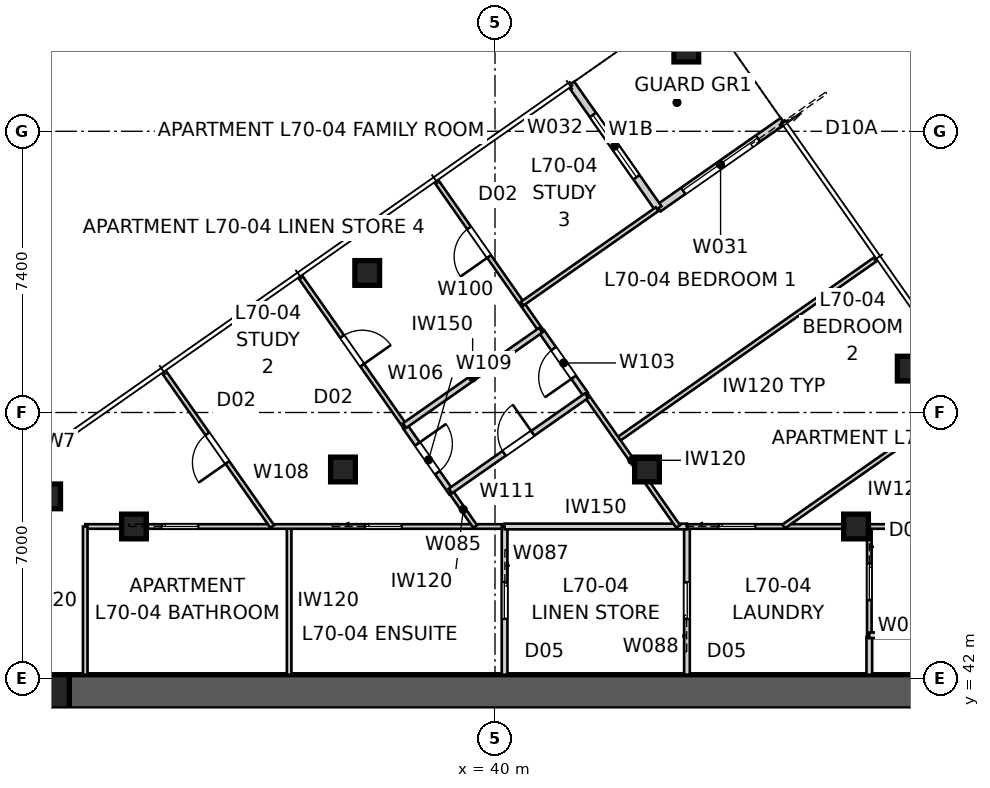
"""IFC4 building model, lengths in metres.
Left out: names, types, materials, properties, quantities, classifications, styles, units other than length and angle.
Written with IfcOpenShell. Run it as: python <this file> out.ifc"""

import sys

from ifc_helpers import new_model, si_unit, direction, frame, frame_2d, origin, origin_2d, place, context, subcontext, project, spatial, polyline, rectangle, outline, extrude, element, fill, save


model = new_model("IFC4")
c1 = context("Model", 3, precision=1e-05, world=origin(), true_north=direction((0.0, 1.0)))
c2 = subcontext(c1, "Body", "Model", "MODEL_VIEW")
j1 = project(units=[si_unit("LENGTHUNIT", "METRE"), si_unit("PLANEANGLEUNIT", "RADIAN")], contexts=[c1])
p1 = place(None, origin())
s1 = spatial("IfcSite", under=j1, at=p1, CompositionType="ELEMENT")
p2 = place(p1, origin())
s2 = spatial("IfcBuilding", under=s1, at=p2, CompositionType="ELEMENT")
p3 = place(p2, frame((0.0, 0.0, 254.0)))
s3 = spatial("IfcBuildingStorey", under=s2, at=p3, CompositionType="ELEMENT", Elevation=254.0)
p4 = place(p3, frame((28.8, 41.65, 0.0), z_axis=(0.0, 0.0, 1.0), x_axis=(1.0, 0.0, 0.0)))
e1 = element("IfcWall", 1, at=p4, inside=s3, PredefinedType="SHEAR", context=c2, shape_type="SweptSolid", body=[
    extrude(outline(polyline([(0.0, -0.45), (22.4, -0.45), (22.4, -0.025), (22.85, -0.025), (22.85, 0.025), (22.4, 0.025), (22.4, 0.45), (0.0, 0.45), (0.0, 0.025), (-0.45, 0.025), (-0.45, -0.025), (0.0, -0.025), (0.0, -0.45)])), origin(), (0.0, 0.0, 1.0), 3.4),
])
p5 = place(p3, frame((28.35, 41.2, 0.0), z_axis=(0.0, 0.0, 1.0), x_axis=(0.0, -1.0, 0.0)))
e2 = element("IfcWall", 2, at=p5, inside=s3, PredefinedType="SHEAR", context=c2, shape_type="SweptSolid", body=[
    extrude(outline(polyline([(0.0, -0.45), (22.4, -0.45), (22.4, -0.025), (22.85, -0.025), (22.85, 0.025), (22.4, 0.025), (22.4, 0.45), (0.0, 0.45), (0.0, 0.025), (-0.45, 0.025), (-0.45, -0.025), (0.0, -0.025), (0.0, -0.45)])), origin(), (0.0, 0.0, 1.0), 3.4),
])
p6 = place(p5, frame((11.14, 0.0, 0.0)))
e3 = element("IfcOpeningElement", 3, at=p6, cuts=e2, PredefinedType="OPENING", context=c2, shape_type="SweptSolid", body=[
    extrude(rectangle(XDim=1.02, YDim=2.4, at=frame_2d((0.51, 1.2))), frame((0.0, 0.46, 0.0), z_axis=(0.0, -1.0, 0.0), x_axis=(1.0, 0.0, 0.0)), (0.0, 0.0, 1.0), 0.92),
])
p7 = place(p3, frame((28.35, 41.65, 0.0), z_axis=(0.0, 0.0, 1.0), x_axis=(1.0, 0.0, 0.0)))
e4 = element("IfcColumn", 4, at=p7, inside=s3, PredefinedType="COLUMN", context=c2, shape_type="SweptSolid", body=[
    extrude(rectangle(XDim=0.9, YDim=0.9, at=origin_2d()), origin(), (0.0, 0.0, 1.0), 3.4),
])
for number, where, z_axis, x_axis in (
    (5, (50.914, 50.155, 0.0), (0.0, 0.0, 1.0), (1.0, 0.0, 0.0)),
    (6, (45.034, 58.551, 0.0), (0.0, 0.0, 1.0), (1.0, 0.0, 0.0)),
    (7, (36.638, 52.672, 0.0), (0.0, 0.0, 1.0), (1.0, 0.0, 0.0)),
    (8, (28.242, 46.793, 0.0), (0.0, 0.0, 1.0), (1.0, 0.0, 0.0)),
    (9, (49.5, 46.0, 0.0), (0.0, 0.0, 1.0), (1.0, 0.0, 0.0)),
    (10, (44.0, 47.5, 0.0), (0.0, 0.0, 1.0), (1.0, 0.0, 0.0)),
    (11, (36.0, 47.5, 0.0), (0.0, 0.0, 1.0), (1.0, 0.0, 0.0)),
    (12, (30.5, 46.0, 0.0), (0.0, 0.0, 1.0), (1.0, 0.0, 0.0)),
):
    element("IfcColumn", number, at=place(p3, frame(where, z_axis=z_axis, x_axis=x_axis)), inside=s3, PredefinedType="COLUMN", context=c2, shape_type="SweptSolid", body=[
        extrude(rectangle(XDim=0.65, YDim=0.65, at=origin_2d()), origin(), (0.0, 0.0, 1.0), 3.4),
    ])
p8 = place(p3, frame((47.574, 56.667, 0.0), z_axis=(0.0, 0.0, 1.0), x_axis=(-0.819165963305, -0.573556557423, 0.0)))
e13 = element("IfcWall", 13, at=p8, inside=s3, PredefinedType="SOLIDWALL", context=c2, shape_type="SweptSolid", body=[
    extrude(rectangle(XDim=4.0, YDim=0.2, at=frame_2d((2.0, 0.0))), origin(), (0.0, 0.0, 1.0), 3.25),
])
p9 = place(p8, frame((0.8, 0.0, 0.0)))
e14 = element("IfcOpeningElement", 14, at=p9, cuts=e13, PredefinedType="OPENING", context=c2, shape_type="SweptSolid", body=[
    extrude(rectangle(XDim=2.4, YDim=2.1, at=frame_2d((1.2, 1.05))), frame((0.0, 0.11, 0.0), z_axis=(0.0, -1.0, 0.0), x_axis=(1.0, 0.0, 0.0)), (0.0, 0.0, 1.0), 0.22),
])
p10 = place(p3, frame((44.298, 54.373, 0.0), z_axis=(0.0, 0.0, 1.0), x_axis=(-0.573597512525, 0.819137286189, 0.0)))
e15 = element("IfcWall", 15, at=p10, inside=s3, PredefinedType="SOLIDWALL", context=c2, shape_type="SweptSolid", body=[
    extrude(rectangle(XDim=4.0, YDim=0.2, at=frame_2d((2.0, 0.0))), origin(), (0.0, 0.0, 1.0), 3.25),
])
p11 = place(p10, frame((1.0, 0.0, 0.45)))
e16 = element("IfcOpeningElement", 16, at=p11, cuts=e15, PredefinedType="OPENING", context=c2, shape_type="SweptSolid", body=[
    extrude(rectangle(XDim=2.0, YDim=1.8, at=frame_2d((1.0, 0.9))), frame((0.0, 0.11, 0.0), z_axis=(0.0, -1.0, 0.0), x_axis=(1.0, 0.0, 0.0)), (0.0, 0.0, 1.0), 0.22),
])
p12 = place(p3, frame((34.583, 46.0, 0.0), z_axis=(0.0, 0.0, 1.0), x_axis=(0.0, -1.0, 0.0)))
e17 = element("IfcWall", 17, at=p12, inside=s3, PredefinedType="PARTITIONING", context=c2, shape_type="SweptSolid", body=[
    extrude(rectangle(XDim=3.9, YDim=0.12, at=frame_2d((1.95, 0.0))), origin(), (0.0, 0.0, 1.0), 3.25),
])
p13 = place(p3, frame((29.219, 46.0, 0.0), z_axis=(0.0, 0.0, 1.0), x_axis=(1.0, 0.0, 0.0)))
e18 = element("IfcWall", 18, at=p13, inside=s3, PredefinedType="PARTITIONING", context=c2, shape_type="SweptSolid", body=[
    extrude(rectangle(XDim=11.034, YDim=0.12, at=frame_2d((5.517, 0.0))), origin(), (0.0, 0.0, 1.0), 2.549),
])
p14 = place(p13, frame((2.01, 0.0, 0.0)))
e19 = element("IfcOpeningElement", 19, at=p14, cuts=e18, PredefinedType="OPENING", context=c2, shape_type="SweptSolid", body=[
    extrude(rectangle(XDim=0.96, YDim=2.1, at=frame_2d((0.48, 1.05))), frame((0.0, 0.07, 0.0), z_axis=(0.0, -1.0, 0.0), x_axis=(1.0, 0.0, 0.0)), (0.0, 0.0, 1.0), 0.14),
])
p15 = place(p13, frame((7.363, 0.0, 0.0)))
e20 = element("IfcOpeningElement", 20, at=p15, cuts=e18, PredefinedType="OPENING", context=c2, shape_type="SweptSolid", body=[
    extrude(rectangle(XDim=0.96, YDim=2.1, at=frame_2d((0.48, 1.05))), frame((0.0, 0.07, 0.0), z_axis=(0.0, -1.0, 0.0), x_axis=(1.0, 0.0, 0.0)), (0.0, 0.0, 1.0), 0.14),
])
p16 = place(p3, frame((29.219, 42.1, 0.0), z_axis=(0.0, 0.0, 1.0), x_axis=(0.0, 1.0, 0.0)))
e21 = element("IfcWall", 21, at=p16, inside=s3, PredefinedType="PARTITIONING", context=c2, shape_type="SweptSolid", body=[
    extrude(rectangle(XDim=3.9, YDim=0.12, at=frame_2d((1.95, 0.0))), origin(), (0.0, 0.0, 1.0), 3.25),
])
p17 = place(p3, frame((40.253, 46.0, 0.0), z_axis=(0.0, 0.0, 1.0), x_axis=(0.0, -1.0, 0.0)))
e22 = element("IfcWall", 22, at=p17, inside=s3, PredefinedType="SOLIDWALL", context=c2, shape_type="SweptSolid", body=[
    extrude(rectangle(XDim=3.9, YDim=0.15, at=frame_2d((1.95, 0.0))), origin(), (0.0, 0.0, 1.0), 3.25),
])
p18 = place(p17, frame((1.47, 0.0, 0.0)))
e23 = element("IfcOpeningElement", 23, at=p18, cuts=e22, PredefinedType="OPENING", context=c2, shape_type="SweptSolid", body=[
    extrude(rectangle(XDim=0.96, YDim=2.1, at=frame_2d((0.48, 1.05))), frame((0.0, 0.085, 0.0), z_axis=(0.0, -1.0, 0.0), x_axis=(1.0, 0.0, 0.0)), (0.0, 0.0, 1.0), 0.17),
])
p19 = place(p3, frame((45.051, 42.1, 0.0), z_axis=(0.0, 0.0, 1.0), x_axis=(0.0, 1.0, 0.0)))
e24 = element("IfcWall", 24, at=p19, inside=s3, PredefinedType="SOLIDWALL", context=c2, shape_type="SweptSolid", body=[
    extrude(rectangle(XDim=3.9, YDim=0.15, at=frame_2d((1.95, 0.0))), origin(), (0.0, 0.0, 1.0), 3.25),
])
p20 = place(p19, frame((1.47, 0.0, 0.0)))
e25 = element("IfcOpeningElement", 25, at=p20, cuts=e24, PredefinedType="OPENING", context=c2, shape_type="SweptSolid", body=[
    extrude(rectangle(XDim=0.96, YDim=2.1, at=frame_2d((0.48, 1.05))), frame((0.0, 0.085, 0.0), z_axis=(0.0, -1.0, 0.0), x_axis=(1.0, 0.0, 0.0)), (0.0, 0.0, 1.0), 0.17),
])
p21 = place(p3, frame((49.85, 46.0, 0.0), z_axis=(0.0, 0.0, 1.0), x_axis=(0.0, -1.0, 0.0)))
e26 = element("IfcWall", 26, at=p21, inside=s3, PredefinedType="PARTITIONING", context=c2, shape_type="SweptSolid", body=[
    extrude(rectangle(XDim=2.913, YDim=0.12, at=frame_2d((1.457, 0.0))), origin(), (0.0, 0.0, 1.0), 3.25),
])
p22 = place(p21, frame((0.977, 0.0, 0.0)))
e27 = element("IfcOpeningElement", 27, at=p22, cuts=e26, PredefinedType="OPENING", context=c2, shape_type="SweptSolid", body=[
    extrude(rectangle(XDim=0.96, YDim=2.1, at=frame_2d((0.48, 1.05))), frame((0.0, 0.07, 0.0), z_axis=(0.0, -1.0, 0.0), x_axis=(1.0, 0.0, 0.0)), (0.0, 0.0, 1.0), 0.14),
])
p23 = place(p3, frame((49.85, 43.087, 0.0), z_axis=(0.0, 0.0, 1.0), x_axis=(0.0, -1.0, 0.0)))
e28 = element("IfcWall", 28, at=p23, inside=s3, PredefinedType="SOLIDWALL", context=c2, shape_type="SweptSolid", body=[
    extrude(rectangle(XDim=0.987, YDim=0.15, at=frame_2d((0.493, 0.0))), origin(), (0.0, 0.0, 1.0), 3.25),
])
p24 = place(p3, frame((45.051, 46.0, 0.0), z_axis=(0.0, 0.0, 1.0), x_axis=(1.0, 0.0, 0.0)))
e29 = element("IfcWall", 29, at=p24, inside=s3, PredefinedType="PARTITIONING", context=c2, shape_type="SweptSolid", body=[
    extrude(rectangle(XDim=9.943, YDim=0.12, at=frame_2d((4.972, 0.0))), origin(), (0.0, 0.0, 1.0), 2.549),
])
p25 = place(p24, frame((0.835, 0.0, 0.0)))
e30 = element("IfcOpeningElement", 30, at=p25, cuts=e29, PredefinedType="OPENING", context=c2, shape_type="SweptSolid", body=[
    extrude(rectangle(XDim=0.96, YDim=2.1, at=frame_2d((0.48, 1.05))), frame((0.0, 0.07, 0.0), z_axis=(0.0, -1.0, 0.0), x_axis=(1.0, 0.0, 0.0)), (0.0, 0.0, 1.0), 0.14),
])
p26 = place(p24, frame((6.935, 0.0, 0.0)))
e31 = element("IfcOpeningElement", 31, at=p26, cuts=e29, PredefinedType="OPENING", context=c2, shape_type="SweptSolid", body=[
    extrude(rectangle(XDim=0.92, YDim=2.34, at=frame_2d((0.46, 1.17))), frame((0.0, 0.07, 0.0), z_axis=(0.0, -1.0, 0.0), x_axis=(1.0, 0.0, 0.0)), (0.0, 0.0, 1.0), 0.14),
])
p27 = place(p3, frame((40.253, 46.0, 0.0), z_axis=(0.0, 0.0, 1.0), x_axis=(1.0, 0.0, 0.0)))
e32 = element("IfcWall", 32, at=p27, inside=s3, PredefinedType="SOLIDWALL", context=c2, shape_type="SweptSolid", body=[
    extrude(rectangle(XDim=4.799, YDim=0.15, at=frame_2d((2.399, 0.0))), origin(), (0.0, 0.0, 1.0), 3.25),
])
p28 = place(p3, frame((56.0, 43.137, 0.0), z_axis=(0.0, 0.0, 1.0), x_axis=(-1.0, 0.0, 0.0)))
e33 = element("IfcWall", 33, at=p28, inside=s3, PredefinedType="SOLIDWALL", context=c2, shape_type="SweptSolid", body=[
    extrude(rectangle(XDim=6.15, YDim=0.15, at=frame_2d((3.075, 0.0))), origin(), (0.0, 0.0, 1.0), 3.25),
])
p29 = place(p28, frame((2.829, 0.0, 0.0)))
e34 = element("IfcOpeningElement", 34, at=p29, cuts=e33, PredefinedType="OPENING", context=c2, shape_type="SweptSolid", body=[
    extrude(rectangle(XDim=0.92, YDim=2.1, at=frame_2d((0.46, 1.05))), frame((0.0, 0.085, 0.0), z_axis=(0.0, -1.0, 0.0), x_axis=(1.0, 0.0, 0.0)), (0.0, 0.0, 1.0), 0.17),
])
p30 = place(p3, frame((50.051, 53.06, 0.0), z_axis=(0.0, 0.0, 1.0), x_axis=(-0.819152099525, -0.573576357466, 0.0)))
e35 = element("IfcWall", 35, at=p30, inside=s3, PredefinedType="PARTITIONING", context=c2, shape_type="SweptSolid", body=[
    extrude(rectangle(XDim=8.335, YDim=0.12, at=frame_2d((4.167, 0.0))), origin(), (0.0, 0.0, 1.0), 3.25),
])
p31 = place(p3, frame((41.232, 51.123, 0.0), z_axis=(0.0, 0.0, 1.0), x_axis=(-0.573586984922, 0.819144657999, 0.0)))
e36 = element("IfcWall", 36, at=p31, inside=s3, PredefinedType="PARTITIONING", context=c2, shape_type="SweptSolid", body=[
    extrude(rectangle(XDim=4.864, YDim=0.12, at=frame_2d((2.432, 0.0))), origin(), (0.0, 0.0, 1.0), 3.25),
])
p32 = place(p31, frame((2.419, 0.0, 0.0)))
e37 = element("IfcOpeningElement", 37, at=p32, cuts=e36, PredefinedType="OPENING", context=c2, shape_type="SweptSolid", body=[
    extrude(rectangle(XDim=0.92, YDim=2.34, at=frame_2d((0.46, 1.17))), frame((0.0, 0.07, 0.0), z_axis=(0.0, -1.0, 0.0), x_axis=(1.0, 0.0, 0.0)), (0.0, 0.0, 1.0), 0.14),
])
p33 = place(p3, frame((44.819, 46.0, 0.0), z_axis=(0.0, 0.0, 1.0), x_axis=(-0.573566368211, 0.819159093985, 0.0)))
e38 = element("IfcWall", 38, at=p33, inside=s3, PredefinedType="PARTITIONING", context=c2, shape_type="SweptSolid", body=[
    extrude(rectangle(XDim=4.253, YDim=0.12, at=frame_2d((2.126, 0.0))), origin(), (0.0, 0.0, 1.0), 3.25),
])
p34 = place(p3, frame((40.714, 51.863, 0.0), z_axis=(0.0, 0.0, 1.0), x_axis=(0.819139307094, 0.573594626521, 0.0)))
e39 = element("IfcWall", 39, at=p34, inside=s3, PredefinedType="PARTITIONING", context=c2, shape_type="SweptSolid", body=[
    extrude(rectangle(XDim=4.335, YDim=0.12, at=frame_2d((2.167, 0.0))), origin(), (0.0, 0.0, 1.0), 3.25),
])
p35 = place(p3, frame((42.38, 49.484, 0.0), z_axis=(0.0, 0.0, 1.0), x_axis=(-0.573585144111, 0.819145946981, 0.0)))
e40 = element("IfcWall", 40, at=p35, inside=s3, PredefinedType="SOLIDWALL", context=c2, shape_type="SweptSolid", body=[
    extrude(rectangle(XDim=2.001, YDim=0.15, at=frame_2d((1.001, 0.0))), origin(), (0.0, 0.0, 1.0), 3.25),
])
p36 = place(p35, frame((0.541, 0.0, 0.0)))
e41 = element("IfcOpeningElement", 41, at=p36, cuts=e40, PredefinedType="OPENING", context=c2, shape_type="SweptSolid", body=[
    extrude(rectangle(XDim=0.92, YDim=2.34, at=frame_2d((0.46, 1.17))), frame((0.0, 0.085, 0.0), z_axis=(0.0, -1.0, 0.0), x_axis=(1.0, 0.0, 0.0)), (0.0, 0.0, 1.0), 0.17),
])
p37 = place(p3, frame((52.56, 49.477, 0.0), z_axis=(0.0, 0.0, 1.0), x_axis=(-0.81915432861, -0.573573173989, 0.0)))
e42 = element("IfcWall", 42, at=p37, inside=s3, PredefinedType="PARTITIONING", context=c2, shape_type="SweptSolid", body=[
    extrude(rectangle(XDim=6.061, YDim=0.12, at=frame_2d((3.031, 0.0))), origin(), (0.0, 0.0, 1.0), 3.25),
])
p38 = place(p3, frame((34.859, 52.598, 0.0), z_axis=(0.0, 0.0, 1.0), x_axis=(0.573586984922, -0.819144657999, 0.0)))
e43 = element("IfcWall", 43, at=p38, inside=s3, PredefinedType="PARTITIONING", context=c2, shape_type="SweptSolid", body=[
    extrude(rectangle(XDim=4.864, YDim=0.12, at=frame_2d((2.432, 0.0))), origin(), (0.0, 0.0, 1.0), 3.25),
])
p39 = place(p38, frame((1.952, 0.0, 0.0)))
e44 = element("IfcOpeningElement", 44, at=p39, cuts=e43, PredefinedType="OPENING", context=c2, shape_type="SweptSolid", body=[
    extrude(rectangle(XDim=0.92, YDim=2.34, at=frame_2d((0.46, 1.17))), frame((0.0, 0.07, 0.0), z_axis=(0.0, -1.0, 0.0), x_axis=(1.0, 0.0, 0.0)), (0.0, 0.0, 1.0), 0.14),
])
p40 = place(p3, frame((38.854, 46.892, 0.0), z_axis=(0.0, 0.0, 1.0), x_axis=(0.57368792347, -0.81907396886, 0.0)))
e45 = element("IfcWall", 45, at=p40, inside=s3, PredefinedType="PARTITIONING", context=c2, shape_type="SweptSolid", body=[
    extrude(rectangle(XDim=1.089, YDim=0.12, at=frame_2d((0.545, 0.0))), origin(), (0.0, 0.0, 1.0), 3.25),
])
p41 = place(p3, frame((34.138, 46.0, 0.0), z_axis=(0.0, 0.0, 1.0), x_axis=(-0.57358708951, 0.819144584763, 0.0)))
e46 = element("IfcWall", 46, at=p41, inside=s3, PredefinedType="PARTITIONING", context=c2, shape_type="SweptSolid", body=[
    extrude(rectangle(XDim=4.991, YDim=0.12, at=frame_2d((2.496, 0.0))), origin(), (0.0, 0.0, 1.0), 3.25),
])
p42 = place(p41, frame((2.055, 0.0, 0.0)))
e47 = element("IfcOpeningElement", 47, at=p42, cuts=e46, PredefinedType="OPENING", context=c2, shape_type="SweptSolid", body=[
    extrude(rectangle(XDim=0.92, YDim=2.34, at=frame_2d((0.46, 1.17))), frame((0.0, 0.07, 0.0), z_axis=(0.0, -1.0, 0.0), x_axis=(1.0, 0.0, 0.0)), (0.0, 0.0, 1.0), 0.14),
])
p43 = place(p3, frame((37.648, 48.614, 0.0), z_axis=(0.0, 0.0, 1.0), x_axis=(0.573485736943, -0.819215545216, 0.0)))
e48 = element("IfcWall", 48, at=p43, inside=s3, PredefinedType="SOLIDWALL", context=c2, shape_type="SweptSolid", body=[
    extrude(rectangle(XDim=2.101, YDim=0.15, at=frame_2d((1.051, 0.0))), origin(), (0.0, 0.0, 1.0), 3.25),
])
p44 = place(p43, frame((0.541, 0.0, 0.0)))
e49 = element("IfcOpeningElement", 49, at=p44, cuts=e48, PredefinedType="OPENING", context=c2, shape_type="SweptSolid", body=[
    extrude(rectangle(XDim=0.92, YDim=2.34, at=frame_2d((0.46, 1.17))), frame((0.0, 0.085, 0.0), z_axis=(0.0, -1.0, 0.0), x_axis=(1.0, 0.0, 0.0)), (0.0, 0.0, 1.0), 0.17),
])
p45 = place(p3, frame((41.203, 51.164, 0.0), z_axis=(0.0, 0.0, 1.0), x_axis=(-0.81916112811, -0.573563463091, 0.0)))
e50 = element("IfcWall", 50, at=p45, inside=s3, PredefinedType="SOLIDWALL", context=c2, shape_type="SweptSolid", body=[
    extrude(rectangle(XDim=4.375, YDim=0.15, at=frame_2d((2.188, 0.0))), origin(), (0.0, 0.0, 1.0), 3.25),
])
p46 = place(p3, frame((38.825, 46.933, 0.0), z_axis=(0.0, 0.0, 1.0), x_axis=(0.81916112811, 0.573563463091, 0.0)))
e51 = element("IfcWall", 51, at=p46, inside=s3, PredefinedType="SOLIDWALL", context=c2, shape_type="SweptSolid", body=[
    extrude(rectangle(XDim=4.375, YDim=0.15, at=frame_2d((2.188, 0.0))), origin(), (0.0, 0.0, 1.0), 3.25),
])
p47 = place(p46, frame((1.728, 0.0, 0.0)))
e52 = element("IfcOpeningElement", 52, at=p47, cuts=e51, PredefinedType="OPENING", context=c2, shape_type="SweptSolid", body=[
    extrude(rectangle(XDim=0.92, YDim=2.34, at=frame_2d((0.46, 1.17))), frame((0.0, 0.085, 0.0), z_axis=(0.0, -1.0, 0.0), x_axis=(1.0, 0.0, 0.0)), (0.0, 0.0, 1.0), 0.17),
])
p48 = place(p3, frame((27.9, 41.619, 0.0), z_axis=(0.0, 0.0, 1.0), x_axis=(0.999397924003, 0.034695669724, 0.0)))
e53 = element("IfcWall", 53, at=p48, inside=s3, PredefinedType="PARTITIONING", context=c2, shape_type="SweptSolid", body=[
    extrude(rectangle(XDim=0.901, YDim=0.12, at=frame_2d((0.45, 0.0))), origin(), (0.0, 0.0, 1.0), 3.25),
])
p49 = place(p9, origin())
e54 = element("IfcDoor", 54, at=p49, inside=s3, OperationType="SLIDING_TO_LEFT", PredefinedType="DOOR", context=c2, shape_type="SweptSolid", body=[
    extrude(rectangle(XDim=2.4, YDim=2.1, at=frame_2d((1.2, 1.05))), frame((0.0, 0.025, 0.0), z_axis=(0.0, -1.0, 0.0), x_axis=(1.0, 0.0, 0.0)), (0.0, 0.0, 1.0), 0.05),
])
fill(e14, e54)
p50 = place(p11, origin())
e55 = element("IfcWindow", 55, at=p50, inside=s3, PartitioningType="SINGLE_PANEL", PredefinedType="WINDOW", context=c2, shape_type="SweptSolid", body=[
    extrude(rectangle(XDim=2.0, YDim=1.8, at=frame_2d((1.0, 0.9))), frame((0.0, 0.03, 0.0), z_axis=(0.0, -1.0, 0.0), x_axis=(1.0, 0.0, 0.0)), (0.0, 0.0, 1.0), 0.06),
])
fill(e16, e55)
p51 = place(p42, origin())
e56 = element("IfcDoor", 56, at=p51, inside=s3, OperationType="SINGLE_SWING_LEFT", PredefinedType="DOOR", context=c2, shape_type="SweptSolid", body=[
    extrude(rectangle(XDim=0.92, YDim=2.34, at=frame_2d((0.46, 1.17))), frame((0.0, 0.025, 0.0), z_axis=(0.0, -1.0, 0.0), x_axis=(1.0, 0.0, 0.0)), (0.0, 0.0, 1.0), 0.05),
])
fill(e47, e56)
p52 = place(p14, origin())
e57 = element("IfcDoor", 57, at=p52, inside=s3, OperationType="SLIDING_TO_LEFT", PredefinedType="DOOR", context=c2, shape_type="SweptSolid", body=[
    extrude(rectangle(XDim=0.96, YDim=2.1, at=frame_2d((0.48, 1.05))), frame((0.0, 0.025, 0.0), z_axis=(0.0, -1.0, 0.0), x_axis=(1.0, 0.0, 0.0)), (0.0, 0.0, 1.0), 0.05),
])
fill(e19, e57)
p53 = place(p15, origin())
e58 = element("IfcDoor", 58, at=p53, inside=s3, OperationType="SLIDING_TO_LEFT", PredefinedType="DOOR", context=c2, shape_type="SweptSolid", body=[
    extrude(rectangle(XDim=0.96, YDim=2.1, at=frame_2d((0.48, 1.05))), frame((0.0, 0.025, 0.0), z_axis=(0.0, -1.0, 0.0), x_axis=(1.0, 0.0, 0.0)), (0.0, 0.0, 1.0), 0.05),
])
fill(e20, e58)
p54 = place(p39, origin())
e59 = element("IfcDoor", 59, at=p54, inside=s3, OperationType="SINGLE_SWING_RIGHT", PredefinedType="DOOR", context=c2, shape_type="SweptSolid", body=[
    extrude(rectangle(XDim=0.92, YDim=2.34, at=frame_2d((0.46, 1.17))), frame((0.0, 0.025, 0.0), z_axis=(0.0, -1.0, 0.0), x_axis=(1.0, 0.0, 0.0)), (0.0, 0.0, 1.0), 0.05),
])
fill(e44, e59)
p55 = place(p44, origin())
e60 = element("IfcDoor", 60, at=p55, inside=s3, OperationType="SINGLE_SWING_LEFT", PredefinedType="DOOR", context=c2, shape_type="SweptSolid", body=[
    extrude(rectangle(XDim=0.92, YDim=2.34, at=frame_2d((0.46, 1.17))), frame((0.0, 0.025, 0.0), z_axis=(0.0, -1.0, 0.0), x_axis=(1.0, 0.0, 0.0)), (0.0, 0.0, 1.0), 0.05),
])
fill(e49, e60)
p56 = place(p18, origin())
e61 = element("IfcDoor", 61, at=p56, inside=s3, OperationType="SLIDING_TO_LEFT", PredefinedType="DOOR", context=c2, shape_type="SweptSolid", body=[
    extrude(rectangle(XDim=0.96, YDim=2.1, at=frame_2d((0.48, 1.05))), frame((0.0, 0.025, 0.0), z_axis=(0.0, -1.0, 0.0), x_axis=(1.0, 0.0, 0.0)), (0.0, 0.0, 1.0), 0.05),
])
fill(e23, e61)
p57 = place(p32, origin())
e62 = element("IfcDoor", 62, at=p57, inside=s3, OperationType="SINGLE_SWING_LEFT", PredefinedType="DOOR", context=c2, shape_type="SweptSolid", body=[
    extrude(rectangle(XDim=0.92, YDim=2.34, at=frame_2d((0.46, 1.17))), frame((0.0, 0.025, 0.0), z_axis=(0.0, -1.0, 0.0), x_axis=(1.0, 0.0, 0.0)), (0.0, 0.0, 1.0), 0.05),
])
fill(e37, e62)
p58 = place(p47, origin())
e63 = element("IfcDoor", 63, at=p58, inside=s3, OperationType="SINGLE_SWING_RIGHT", PredefinedType="DOOR", context=c2, shape_type="SweptSolid", body=[
    extrude(rectangle(XDim=0.92, YDim=2.34, at=frame_2d((0.46, 1.17))), frame((0.0, 0.025, 0.0), z_axis=(0.0, -1.0, 0.0), x_axis=(1.0, 0.0, 0.0)), (0.0, 0.0, 1.0), 0.05),
])
fill(e52, e63)
p59 = place(p36, origin())
e64 = element("IfcDoor", 64, at=p59, inside=s3, OperationType="SINGLE_SWING_LEFT", PredefinedType="DOOR", context=c2, shape_type="SweptSolid", body=[
    extrude(rectangle(XDim=0.92, YDim=2.34, at=frame_2d((0.46, 1.17))), frame((0.0, 0.025, 0.0), z_axis=(0.0, -1.0, 0.0), x_axis=(1.0, 0.0, 0.0)), (0.0, 0.0, 1.0), 0.05),
])
fill(e41, e64)
p60 = place(p20, origin())
e65 = element("IfcDoor", 65, at=p60, inside=s3, OperationType="SLIDING_TO_LEFT", PredefinedType="DOOR", context=c2, shape_type="SweptSolid", body=[
    extrude(rectangle(XDim=0.96, YDim=2.1, at=frame_2d((0.48, 1.05))), frame((0.0, 0.025, 0.0), z_axis=(0.0, -1.0, 0.0), x_axis=(1.0, 0.0, 0.0)), (0.0, 0.0, 1.0), 0.05),
])
fill(e25, e65)
p61 = place(p22, origin())
e66 = element("IfcDoor", 66, at=p61, inside=s3, OperationType="SLIDING_TO_LEFT", PredefinedType="DOOR", context=c2, shape_type="SweptSolid", body=[
    extrude(rectangle(XDim=0.96, YDim=2.1, at=frame_2d((0.48, 1.05))), frame((0.0, 0.025, 0.0), z_axis=(0.0, -1.0, 0.0), x_axis=(1.0, 0.0, 0.0)), (0.0, 0.0, 1.0), 0.05),
])
fill(e27, e66)
p62 = place(p25, origin())
e67 = element("IfcDoor", 67, at=p62, inside=s3, OperationType="SLIDING_TO_LEFT", PredefinedType="DOOR", context=c2, shape_type="SweptSolid", body=[
    extrude(rectangle(XDim=0.96, YDim=2.1, at=frame_2d((0.48, 1.05))), frame((0.0, 0.025, 0.0), z_axis=(0.0, -1.0, 0.0), x_axis=(1.0, 0.0, 0.0)), (0.0, 0.0, 1.0), 0.05),
])
fill(e30, e67)
save(model, sys.argv[1])
